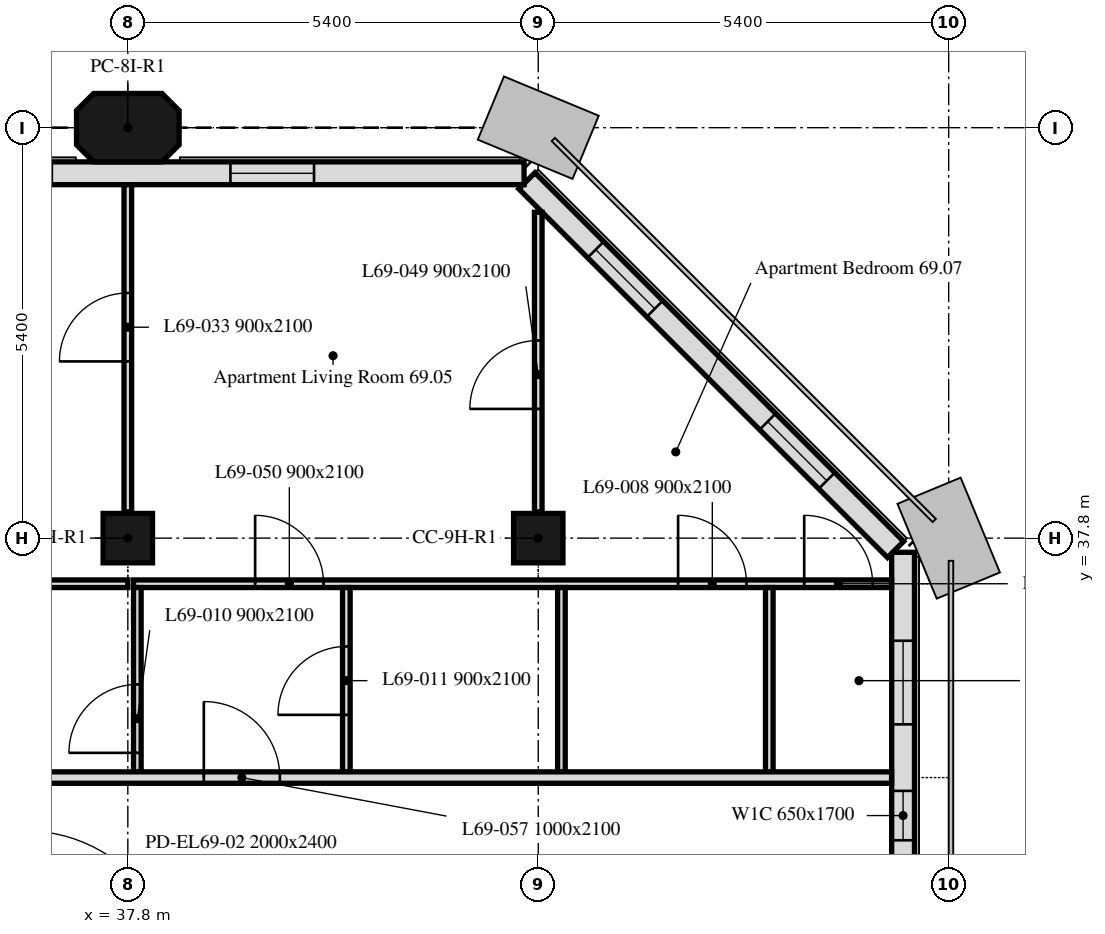
"""IFC4 building model, lengths in metres.
Left out: names, types, materials, properties, quantities, classifications, styles, units other than length and angle.
Written with IfcOpenShell. Run it as: python <this file> out.ifc"""

import sys

from ifc_helpers import new_model, si_unit, direction, frame, frame_2d, origin, origin_2d, place, context, subcontext, project, spatial, polyline, rectangle, outline, extrude, element, fill, save


model = new_model("IFC4")
c1 = context("Model", 3, precision=1e-05, world=origin(), true_north=direction((0.0, 1.0)))
c2 = subcontext(c1, "Body", "Model", "MODEL_VIEW")
j1 = project(units=[si_unit("LENGTHUNIT", "METRE"), si_unit("PLANEANGLEUNIT", "RADIAN")], contexts=[c1])
p1 = place(None, origin())
s1 = spatial("IfcSite", under=j1, at=p1, CompositionType="ELEMENT")
p2 = place(p1, origin())
s2 = spatial("IfcBuilding", under=s1, at=p2, CompositionType="ELEMENT")
p3 = place(p2, frame((0.0, 0.0, 281.8)))
s3 = spatial("IfcBuildingStorey", under=s2, at=p3, CompositionType="ELEMENT", Elevation=281.8)
for number, where, z_axis, x_axis in (
    (1, (37.8, 37.8, 0.0), (0.0, 0.0, 1.0), (1.0, 0.0, 0.0)),
    (2, (43.2, 37.8, 0.0), (0.0, 0.0, 1.0), (1.0, 0.0, 0.0)),
):
    element("IfcColumn", number, at=place(p3, frame(where, z_axis=z_axis, x_axis=x_axis)), inside=s3, PredefinedType="COLUMN", context=c2, shape_type="SweptSolid", body=[
        extrude(rectangle(XDim=0.65, YDim=0.65, at=origin_2d()), origin(), (0.0, 0.0, 1.0), 3.0),
    ])
p4 = place(p3, frame((37.8, 43.2, 0.0), z_axis=(0.0, 0.0, 1.0), x_axis=(1.0, 0.0, 0.0)))
e3 = element("IfcColumn", 3, at=p4, inside=s3, PredefinedType="COLUMN", context=c2, shape_type="SweptSolid", body=[
    extrude(outline(polyline([(-0.45, -0.45), (0.45, -0.45), (0.675, -0.225), (0.675, 0.225), (0.45, 0.45), (-0.45, 0.45), (-0.675, 0.225), (-0.675, -0.225), (-0.45, -0.45)])), origin(), (0.0, 0.0, 1.0), 3.0),
])
p5 = place(p3, frame((48.0, 5.586, 0.0), z_axis=(0.0, 0.0, 1.0), x_axis=(0.0, 1.0, 0.0)))
e4 = element("IfcWall", 4, at=p5, inside=s3, PredefinedType="SOLIDWALL", context=c2, shape_type="SweptSolid", body=[
    extrude(rectangle(XDim=32.027, YDim=0.3, at=frame_2d((16.014, 0.0))), origin(), (0.0, 0.0, 1.0), 3.0),
])
p6 = place(p5, frame((1.164, 0.0, 0.9)))
e5 = element("IfcOpeningElement", 5, at=p6, cuts=e4, PredefinedType="OPENING", context=c2, shape_type="SweptSolid", body=[
    extrude(rectangle(XDim=1.1, YDim=1.7, at=frame_2d((0.55, 0.85))), frame((0.0, 0.16, 0.0), z_axis=(0.0, -1.0, 0.0), x_axis=(1.0, 0.0, 0.0)), (0.0, 0.0, 1.0), 0.32),
])
p7 = place(p5, frame((2.764, 0.0, 0.9)))
e6 = element("IfcOpeningElement", 6, at=p7, cuts=e4, PredefinedType="OPENING", context=c2, shape_type="SweptSolid", body=[
    extrude(rectangle(XDim=1.1, YDim=1.7, at=frame_2d((0.55, 0.85))), frame((0.0, 0.16, 0.0), z_axis=(0.0, -1.0, 0.0), x_axis=(1.0, 0.0, 0.0)), (0.0, 0.0, 1.0), 0.32),
])
p8 = place(p5, frame((6.564, 0.0, 0.9)))
e7 = element("IfcOpeningElement", 7, at=p8, cuts=e4, PredefinedType="OPENING", context=c2, shape_type="SweptSolid", body=[
    extrude(rectangle(XDim=1.1, YDim=1.7, at=frame_2d((0.55, 0.85))), frame((0.0, 0.16, 0.0), z_axis=(0.0, -1.0, 0.0), x_axis=(1.0, 0.0, 0.0)), (0.0, 0.0, 1.0), 0.32),
])
p9 = place(p5, frame((8.514, 0.0, 0.9)))
e8 = element("IfcOpeningElement", 8, at=p9, cuts=e4, PredefinedType="OPENING", context=c2, shape_type="SweptSolid", body=[
    extrude(rectangle(XDim=1.1, YDim=1.7, at=frame_2d((0.55, 0.85))), frame((0.0, 0.16, 0.0), z_axis=(0.0, -1.0, 0.0), x_axis=(1.0, 0.0, 0.0)), (0.0, 0.0, 1.0), 0.32),
])
p10 = place(p5, frame((11.964, 0.0, 0.9)))
e9 = element("IfcOpeningElement", 9, at=p10, cuts=e4, PredefinedType="OPENING", context=c2, shape_type="SweptSolid", body=[
    extrude(rectangle(XDim=1.1, YDim=1.7, at=frame_2d((0.55, 0.85))), frame((0.0, 0.16, 0.0), z_axis=(0.0, -1.0, 0.0), x_axis=(1.0, 0.0, 0.0)), (0.0, 0.0, 1.0), 0.32),
])
p11 = place(p5, frame((13.564, 0.0, 0.9)))
e10 = element("IfcOpeningElement", 10, at=p11, cuts=e4, PredefinedType="OPENING", context=c2, shape_type="SweptSolid", body=[
    extrude(rectangle(XDim=1.1, YDim=1.7, at=frame_2d((0.55, 0.85))), frame((0.0, 0.16, 0.0), z_axis=(0.0, -1.0, 0.0), x_axis=(1.0, 0.0, 0.0)), (0.0, 0.0, 1.0), 0.32),
])
p12 = place(p5, frame((17.014, 0.0, 0.9)))
e11 = element("IfcOpeningElement", 11, at=p12, cuts=e4, PredefinedType="OPENING", context=c2, shape_type="SweptSolid", body=[
    extrude(rectangle(XDim=3.4, YDim=1.7, at=frame_2d((1.7, 0.85))), frame((0.0, 0.16, 0.0), z_axis=(0.0, -1.0, 0.0), x_axis=(1.0, 0.0, 0.0)), (0.0, 0.0, 1.0), 0.32),
])
p13 = place(p5, frame((22.764, 0.0, 0.9)))
e12 = element("IfcOpeningElement", 12, at=p13, cuts=e4, PredefinedType="OPENING", context=c2, shape_type="SweptSolid", body=[
    extrude(rectangle(XDim=1.1, YDim=1.7, at=frame_2d((0.55, 0.85))), frame((0.0, 0.16, 0.0), z_axis=(0.0, -1.0, 0.0), x_axis=(1.0, 0.0, 0.0)), (0.0, 0.0, 1.0), 0.32),
])
p14 = place(p5, frame((24.364, 0.0, 0.9)))
e13 = element("IfcOpeningElement", 13, at=p14, cuts=e4, PredefinedType="OPENING", context=c2, shape_type="SweptSolid", body=[
    extrude(rectangle(XDim=1.1, YDim=1.7, at=frame_2d((0.55, 0.85))), frame((0.0, 0.16, 0.0), z_axis=(0.0, -1.0, 0.0), x_axis=(1.0, 0.0, 0.0)), (0.0, 0.0, 1.0), 0.32),
])
p15 = place(p5, frame((28.239, 0.0, 0.9)))
e14 = element("IfcOpeningElement", 14, at=p15, cuts=e4, PredefinedType="OPENING", context=c2, shape_type="SweptSolid", body=[
    extrude(rectangle(XDim=0.65, YDim=1.7, at=frame_2d((0.325, 0.85))), frame((0.0, 0.16, 0.0), z_axis=(0.0, -1.0, 0.0), x_axis=(1.0, 0.0, 0.0)), (0.0, 0.0, 1.0), 0.32),
])
p16 = place(p5, frame((29.764, 0.0, 0.9)))
e15 = element("IfcOpeningElement", 15, at=p16, cuts=e4, PredefinedType="OPENING", context=c2, shape_type="SweptSolid", body=[
    extrude(rectangle(XDim=1.1, YDim=1.7, at=frame_2d((0.55, 0.85))), frame((0.0, 0.16, 0.0), z_axis=(0.0, -1.0, 0.0), x_axis=(1.0, 0.0, 0.0)), (0.0, 0.0, 1.0), 0.32),
])
p17 = place(p3, frame((47.901, 37.65, 0.0), z_axis=(0.0, 0.0, 1.0), x_axis=(-0.707106781187, 0.707106781187, 0.0)))
e16 = element("IfcWall", 16, at=p17, inside=s3, PredefinedType="SOLIDWALL", context=c2, shape_type="SweptSolid", body=[
    extrude(rectangle(XDim=6.86, YDim=0.3, at=frame_2d((3.43, 0.0))), origin(), (0.0, 0.0, 1.0), 3.0),
])
p18 = place(p17, frame((1.28, 0.0, 0.9)))
e17 = element("IfcOpeningElement", 17, at=p18, cuts=e16, PredefinedType="OPENING", context=c2, shape_type="SweptSolid", body=[
    extrude(rectangle(XDim=1.1, YDim=1.7, at=frame_2d((0.55, 0.85))), frame((0.0, 0.16, 0.0), z_axis=(0.0, -1.0, 0.0), x_axis=(1.0, 0.0, 0.0)), (0.0, 0.0, 1.0), 0.32),
])
p19 = place(p17, frame((4.48, 0.0, 0.9)))
e18 = element("IfcOpeningElement", 18, at=p19, cuts=e16, PredefinedType="OPENING", context=c2, shape_type="SweptSolid", body=[
    extrude(rectangle(XDim=1.1, YDim=1.7, at=frame_2d((0.55, 0.85))), frame((0.0, 0.16, 0.0), z_axis=(0.0, -1.0, 0.0), x_axis=(1.0, 0.0, 0.0)), (0.0, 0.0, 1.0), 0.32),
])
p20 = place(p3, frame((43.014, 42.6, 0.0), z_axis=(0.0, 0.0, 1.0), x_axis=(-1.0, 0.0, 0.0)))
e19 = element("IfcWall", 19, at=p20, inside=s3, PredefinedType="SOLIDWALL", context=c2, shape_type="SweptSolid", body=[
    extrude(rectangle(XDim=32.027, YDim=0.3, at=frame_2d((16.014, 0.0))), origin(), (0.0, 0.0, 1.0), 3.0),
])
p21 = place(p20, frame((2.764, 0.0, 0.9)))
e20 = element("IfcOpeningElement", 20, at=p21, cuts=e19, PredefinedType="OPENING", context=c2, shape_type="SweptSolid", body=[
    extrude(rectangle(XDim=1.1, YDim=1.7, at=frame_2d((0.55, 0.85))), frame((0.0, 0.16, 0.0), z_axis=(0.0, -1.0, 0.0), x_axis=(1.0, 0.0, 0.0)), (0.0, 0.0, 1.0), 0.32),
])
p22 = place(p20, frame((6.214, 0.0, 0.9)))
e21 = element("IfcOpeningElement", 21, at=p22, cuts=e19, PredefinedType="OPENING", context=c2, shape_type="SweptSolid", body=[
    extrude(rectangle(XDim=3.4, YDim=1.7, at=frame_2d((1.7, 0.85))), frame((0.0, 0.16, 0.0), z_axis=(0.0, -1.0, 0.0), x_axis=(1.0, 0.0, 0.0)), (0.0, 0.0, 1.0), 0.32),
])
p23 = place(p20, frame((13.564, 0.0, 0.9)))
e22 = element("IfcOpeningElement", 22, at=p23, cuts=e19, PredefinedType="OPENING", context=c2, shape_type="SweptSolid", body=[
    extrude(rectangle(XDim=1.1, YDim=1.7, at=frame_2d((0.55, 0.85))), frame((0.0, 0.16, 0.0), z_axis=(0.0, -1.0, 0.0), x_axis=(1.0, 0.0, 0.0)), (0.0, 0.0, 1.0), 0.32),
])
p24 = place(p20, frame((17.014, 0.0, 0.9)))
e23 = element("IfcOpeningElement", 23, at=p24, cuts=e19, PredefinedType="OPENING", context=c2, shape_type="SweptSolid", body=[
    extrude(rectangle(XDim=3.4, YDim=1.7, at=frame_2d((1.7, 0.85))), frame((0.0, 0.16, 0.0), z_axis=(0.0, -1.0, 0.0), x_axis=(1.0, 0.0, 0.0)), (0.0, 0.0, 1.0), 0.32),
])
p25 = place(p20, frame((24.364, 0.0, 0.9)))
e24 = element("IfcOpeningElement", 24, at=p25, cuts=e19, PredefinedType="OPENING", context=c2, shape_type="SweptSolid", body=[
    extrude(rectangle(XDim=1.1, YDim=1.7, at=frame_2d((0.55, 0.85))), frame((0.0, 0.16, 0.0), z_axis=(0.0, -1.0, 0.0), x_axis=(1.0, 0.0, 0.0)), (0.0, 0.0, 1.0), 0.32),
])
p26 = place(p20, frame((27.814, 0.0, 0.9)))
e25 = element("IfcOpeningElement", 25, at=p26, cuts=e19, PredefinedType="OPENING", context=c2, shape_type="SweptSolid", body=[
    extrude(rectangle(XDim=3.4, YDim=1.7, at=frame_2d((1.7, 0.85))), frame((0.0, 0.16, 0.0), z_axis=(0.0, -1.0, 0.0), x_axis=(1.0, 0.0, 0.0)), (0.0, 0.0, 1.0), 0.32),
])
p27 = place(p3, frame((27.164, 37.2, 0.0), z_axis=(0.0, 0.0, 1.0), x_axis=(1.0, 0.0, 0.0)))
e26 = element("IfcWall", 26, at=p27, inside=s3, PredefinedType="PARTITIONING", context=c2, shape_type="SweptSolid", body=[
    extrude(rectangle(XDim=10.636, YDim=0.1, at=frame_2d((5.318, 0.0))), origin(), (0.0, 0.0, 1.0), 3.0),
])
p28 = place(p27, frame((1.807, 0.0, 0.0)))
e27 = element("IfcOpeningElement", 27, at=p28, cuts=e26, PredefinedType="OPENING", context=c2, shape_type="SweptSolid", body=[
    extrude(rectangle(XDim=0.9, YDim=2.1, at=frame_2d((0.45, 1.05))), frame((0.0, 0.05, 0.0), z_axis=(0.0, -1.0, 0.0), x_axis=(1.0, 0.0, 0.0)), (0.0, 0.0, 1.0), 0.1),
])
p29 = place(p27, frame((3.941, 0.0, 0.0)))
e28 = element("IfcOpeningElement", 28, at=p29, cuts=e26, PredefinedType="OPENING", context=c2, shape_type="SweptSolid", body=[
    extrude(rectangle(XDim=0.9, YDim=2.1, at=frame_2d((0.45, 1.05))), frame((0.0, 0.05, 0.0), z_axis=(0.0, -1.0, 0.0), x_axis=(1.0, 0.0, 0.0)), (0.0, 0.0, 1.0), 0.1),
])
p30 = place(p27, frame((6.586, 0.0, 0.0)))
e29 = element("IfcOpeningElement", 29, at=p30, cuts=e26, PredefinedType="OPENING", context=c2, shape_type="SweptSolid", body=[
    extrude(rectangle(XDim=0.9, YDim=2.1, at=frame_2d((0.45, 1.05))), frame((0.0, 0.05, 0.0), z_axis=(0.0, -1.0, 0.0), x_axis=(1.0, 0.0, 0.0)), (0.0, 0.0, 1.0), 0.1),
])
p31 = place(p3, frame((37.8, 38.145, 0.0), z_axis=(0.0, 0.0, 1.0), x_axis=(0.0, 1.0, 0.0)))
e30 = element("IfcWall", 30, at=p31, inside=s3, PredefinedType="PARTITIONING", context=c2, shape_type="SweptSolid", body=[
    extrude(rectangle(XDim=4.304, YDim=0.1, at=frame_2d((2.152, 0.0))), origin(), (0.0, 0.0, 1.0), 3.0),
])
p32 = place(p31, frame((1.98, 0.0, 0.0)))
e31 = element("IfcOpeningElement", 31, at=p32, cuts=e30, PredefinedType="OPENING", context=c2, shape_type="SweptSolid", body=[
    extrude(rectangle(XDim=0.9, YDim=2.1, at=frame_2d((0.45, 1.05))), frame((0.0, 0.05, 0.0), z_axis=(0.0, -1.0, 0.0), x_axis=(1.0, 0.0, 0.0)), (0.0, 0.0, 1.0), 0.1),
])
p33 = place(p3, frame((43.2, 38.145, 0.0), z_axis=(0.0, 0.0, 1.0), x_axis=(0.0, 1.0, 0.0)))
e32 = element("IfcWall", 32, at=p33, inside=s3, PredefinedType="PARTITIONING", context=c2, shape_type="SweptSolid", body=[
    extrude(rectangle(XDim=3.943, YDim=0.1, at=frame_2d((1.971, 0.0))), origin(), (0.0, 0.0, 1.0), 3.0),
])
p34 = place(p33, frame((1.355, 0.0, 0.0)))
e33 = element("IfcOpeningElement", 33, at=p34, cuts=e32, PredefinedType="OPENING", context=c2, shape_type="SweptSolid", body=[
    extrude(rectangle(XDim=0.9, YDim=2.1, at=frame_2d((0.45, 1.05))), frame((0.0, 0.05, 0.0), z_axis=(0.0, -1.0, 0.0), x_axis=(1.0, 0.0, 0.0)), (0.0, 0.0, 1.0), 0.1),
])
p35 = place(p3, frame((37.875, 37.2, 0.0), z_axis=(0.0, 0.0, 1.0), x_axis=(1.0, 0.0, 0.0)))
e34 = element("IfcWall", 34, at=p35, inside=s3, PredefinedType="PARTITIONING", context=c2, shape_type="SweptSolid", body=[
    extrude(rectangle(XDim=9.974, YDim=0.1, at=frame_2d((4.987, 0.0))), origin(), (0.0, 0.0, 1.0), 3.0),
])
p36 = place(p35, frame((7.165, 0.0, 0.0)))
e35 = element("IfcOpeningElement", 35, at=p36, cuts=e34, PredefinedType="OPENING", context=c2, shape_type="SweptSolid", body=[
    extrude(rectangle(XDim=0.9, YDim=2.1, at=frame_2d((0.45, 1.05))), frame((0.0, 0.05, 0.0), z_axis=(0.0, -1.0, 0.0), x_axis=(1.0, 0.0, 0.0)), (0.0, 0.0, 1.0), 0.1),
])
p37 = place(p35, frame((8.824, 0.0, 0.0)))
e36 = element("IfcOpeningElement", 36, at=p37, cuts=e34, PredefinedType="OPENING", context=c2, shape_type="SweptSolid", body=[
    extrude(rectangle(XDim=0.9, YDim=2.1, at=frame_2d((0.45, 1.05))), frame((0.0, 0.05, 0.0), z_axis=(0.0, -1.0, 0.0), x_axis=(1.0, 0.0, 0.0)), (0.0, 0.0, 1.0), 0.1),
])
p38 = place(p35, frame((1.6, 0.0, 0.0)))
e37 = element("IfcOpeningElement", 37, at=p38, cuts=e34, PredefinedType="OPENING", context=c2, shape_type="SweptSolid", body=[
    extrude(rectangle(XDim=0.9, YDim=2.1, at=frame_2d((0.45, 1.05))), frame((0.0, 0.05, 0.0), z_axis=(0.0, -1.0, 0.0), x_axis=(1.0, 0.0, 0.0)), (0.0, 0.0, 1.0), 0.1),
])
p39 = place(p3, frame((37.925, 34.725, 0.0), z_axis=(0.0, 0.0, 1.0), x_axis=(0.0, 1.0, 0.0)))
e38 = element("IfcWall", 38, at=p39, inside=s3, PredefinedType="PARTITIONING", context=c2, shape_type="SweptSolid", body=[
    extrude(rectangle(XDim=2.425, YDim=0.1, at=frame_2d((1.212, 0.0))), origin(), (0.0, 0.0, 1.0), 3.0),
])
p40 = place(p39, frame((0.25, 0.0, 0.0)))
e39 = element("IfcOpeningElement", 39, at=p40, cuts=e38, PredefinedType="OPENING", context=c2, shape_type="SweptSolid", body=[
    extrude(rectangle(XDim=0.9, YDim=2.1, at=frame_2d((0.45, 1.05))), frame((0.0, 0.05, 0.0), z_axis=(0.0, -1.0, 0.0), x_axis=(1.0, 0.0, 0.0)), (0.0, 0.0, 1.0), 0.1),
])
p41 = place(p3, frame((40.675, 34.725, 0.0), z_axis=(0.0, 0.0, 1.0), x_axis=(0.0, 1.0, 0.0)))
e40 = element("IfcWall", 40, at=p41, inside=s3, PredefinedType="PARTITIONING", context=c2, shape_type="SweptSolid", body=[
    extrude(rectangle(XDim=2.425, YDim=0.1, at=frame_2d((1.212, 0.0))), origin(), (0.0, 0.0, 1.0), 3.0),
])
p42 = place(p41, frame((0.75, 0.0, 0.0)))
e41 = element("IfcOpeningElement", 41, at=p42, cuts=e40, PredefinedType="OPENING", context=c2, shape_type="SweptSolid", body=[
    extrude(rectangle(XDim=0.9, YDim=2.1, at=frame_2d((0.45, 1.05))), frame((0.0, 0.05, 0.0), z_axis=(0.0, -1.0, 0.0), x_axis=(1.0, 0.0, 0.0)), (0.0, 0.0, 1.0), 0.1),
])
for number, where, z_axis, x_axis in (
    (42, (43.505, 34.725, 0.0), (0.0, 0.0, 1.0), (0.0, 1.0, 0.0)),
    (43, (46.24, 34.725, 0.0), (0.0, 0.0, 1.0), (0.0, 1.0, 0.0)),
):
    element("IfcWall", number, at=place(p3, frame(where, z_axis=z_axis, x_axis=x_axis)), inside=s3, PredefinedType="PARTITIONING", context=c2, shape_type="SweptSolid", body=[
        extrude(rectangle(XDim=2.425, YDim=0.1, at=frame_2d((1.212, 0.0))), origin(), (0.0, 0.0, 1.0), 3.0),
    ])
p43 = place(p3, frame((6.151, 34.65, 0.0), z_axis=(0.0, 0.0, 1.0), x_axis=(1.0, 0.0, 0.0)))
e44 = element("IfcWall", 44, at=p43, inside=s3, PredefinedType="PARTITIONING", context=c2, shape_type="SweptSolid", body=[
    extrude(rectangle(XDim=41.698, YDim=0.15, at=frame_2d((20.849, 0.0))), origin(), (0.0, 0.0, 1.0), 3.0),
])
p44 = place(p43, frame((2.519, 0.0, 0.0)))
e45 = element("IfcOpeningElement", 45, at=p44, cuts=e44, PredefinedType="OPENING", context=c2, shape_type="SweptSolid", body=[
    extrude(rectangle(XDim=1.0, YDim=2.1, at=frame_2d((0.5, 1.05))), frame((0.0, 0.075, 0.0), z_axis=(0.0, -1.0, 0.0), x_axis=(1.0, 0.0, 0.0)), (0.0, 0.0, 1.0), 0.15),
])
p45 = place(p43, frame((13.077, 0.0, 0.0)))
e46 = element("IfcOpeningElement", 46, at=p45, cuts=e44, PredefinedType="OPENING", context=c2, shape_type="SweptSolid", body=[
    extrude(rectangle(XDim=1.0, YDim=2.1, at=frame_2d((0.5, 1.05))), frame((0.0, 0.075, 0.0), z_axis=(0.0, -1.0, 0.0), x_axis=(1.0, 0.0, 0.0)), (0.0, 0.0, 1.0), 0.15),
])
p46 = place(p43, frame((32.649, 0.0, 0.0)))
e47 = element("IfcOpeningElement", 47, at=p46, cuts=e44, PredefinedType="OPENING", context=c2, shape_type="SweptSolid", body=[
    extrude(rectangle(XDim=1.0, YDim=2.1, at=frame_2d((0.5, 1.05))), frame((0.0, 0.075, 0.0), z_axis=(0.0, -1.0, 0.0), x_axis=(1.0, 0.0, 0.0)), (0.0, 0.0, 1.0), 0.15),
])
p47 = place(p15, origin())
e48 = element("IfcWindow", 48, at=p47, inside=s3, PartitioningType="SINGLE_PANEL", PredefinedType="WINDOW", context=c2, shape_type="SweptSolid", body=[
    extrude(rectangle(XDim=0.65, YDim=1.7, at=frame_2d((0.325, 0.85))), frame((0.0, 0.03, 0.0), z_axis=(0.0, -1.0, 0.0), x_axis=(1.0, 0.0, 0.0)), (0.0, 0.0, 1.0), 0.06),
])
fill(e14, e48)
p48 = place(p16, origin())
e49 = element("IfcWindow", 49, at=p48, inside=s3, PartitioningType="SINGLE_PANEL", PredefinedType="WINDOW", context=c2, shape_type="SweptSolid", body=[
    extrude(rectangle(XDim=1.1, YDim=1.7, at=frame_2d((0.55, 0.85))), frame((0.0, 0.03, 0.0), z_axis=(0.0, -1.0, 0.0), x_axis=(1.0, 0.0, 0.0)), (0.0, 0.0, 1.0), 0.06),
])
fill(e15, e49)
p49 = place(p18, origin())
e50 = element("IfcWindow", 50, at=p49, inside=s3, PartitioningType="SINGLE_PANEL", PredefinedType="WINDOW", context=c2, shape_type="SweptSolid", body=[
    extrude(rectangle(XDim=1.1, YDim=1.7, at=frame_2d((0.55, 0.85))), frame((0.0, 0.03, 0.0), z_axis=(0.0, -1.0, 0.0), x_axis=(1.0, 0.0, 0.0)), (0.0, 0.0, 1.0), 0.06),
])
fill(e17, e50)
p50 = place(p19, origin())
e51 = element("IfcWindow", 51, at=p50, inside=s3, PartitioningType="SINGLE_PANEL", PredefinedType="WINDOW", context=c2, shape_type="SweptSolid", body=[
    extrude(rectangle(XDim=1.1, YDim=1.7, at=frame_2d((0.55, 0.85))), frame((0.0, 0.03, 0.0), z_axis=(0.0, -1.0, 0.0), x_axis=(1.0, 0.0, 0.0)), (0.0, 0.0, 1.0), 0.06),
])
fill(e18, e51)
p51 = place(p21, origin())
e52 = element("IfcWindow", 52, at=p51, inside=s3, PartitioningType="SINGLE_PANEL", PredefinedType="WINDOW", context=c2, shape_type="SweptSolid", body=[
    extrude(rectangle(XDim=1.1, YDim=1.7, at=frame_2d((0.55, 0.85))), frame((0.0, 0.03, 0.0), z_axis=(0.0, -1.0, 0.0), x_axis=(1.0, 0.0, 0.0)), (0.0, 0.0, 1.0), 0.06),
])
fill(e20, e52)
p52 = place(p36, origin())
e53 = element("IfcDoor", 53, at=p52, inside=s3, OperationType="SINGLE_SWING_RIGHT", PredefinedType="DOOR", context=c2, shape_type="SweptSolid", body=[
    extrude(rectangle(XDim=0.9, YDim=2.1, at=frame_2d((0.45, 1.05))), frame((0.0, 0.025, 0.0), z_axis=(0.0, -1.0, 0.0), x_axis=(1.0, 0.0, 0.0)), (0.0, 0.0, 1.0), 0.05),
])
fill(e35, e53)
p53 = place(p37, origin())
e54 = element("IfcDoor", 54, at=p53, inside=s3, OperationType="SINGLE_SWING_LEFT", PredefinedType="DOOR", context=c2, shape_type="SweptSolid", body=[
    extrude(rectangle(XDim=0.9, YDim=2.1, at=frame_2d((0.45, 1.05))), frame((0.0, 0.025, 0.0), z_axis=(0.0, -1.0, 0.0), x_axis=(1.0, 0.0, 0.0)), (0.0, 0.0, 1.0), 0.05),
])
fill(e36, e54)
p54 = place(p40, origin())
e55 = element("IfcDoor", 55, at=p54, inside=s3, OperationType="SINGLE_SWING_LEFT", PredefinedType="DOOR", context=c2, shape_type="SweptSolid", body=[
    extrude(rectangle(XDim=0.9, YDim=2.1, at=frame_2d((0.45, 1.05))), frame((0.0, 0.025, 0.0), z_axis=(0.0, -1.0, 0.0), x_axis=(1.0, 0.0, 0.0)), (0.0, 0.0, 1.0), 0.05),
])
fill(e39, e55)
p55 = place(p42, origin())
e56 = element("IfcDoor", 56, at=p55, inside=s3, OperationType="SINGLE_SWING_RIGHT", PredefinedType="DOOR", context=c2, shape_type="SweptSolid", body=[
    extrude(rectangle(XDim=0.9, YDim=2.1, at=frame_2d((0.45, 1.05))), frame((0.0, 0.025, 0.0), z_axis=(0.0, -1.0, 0.0), x_axis=(1.0, 0.0, 0.0)), (0.0, 0.0, 1.0), 0.05),
])
fill(e41, e56)
p56 = place(p32, origin())
e57 = element("IfcDoor", 57, at=p56, inside=s3, OperationType="SINGLE_SWING_RIGHT", PredefinedType="DOOR", context=c2, shape_type="SweptSolid", body=[
    extrude(rectangle(XDim=0.9, YDim=2.1, at=frame_2d((0.45, 1.05))), frame((0.0, 0.025, 0.0), z_axis=(0.0, -1.0, 0.0), x_axis=(1.0, 0.0, 0.0)), (0.0, 0.0, 1.0), 0.05),
])
fill(e31, e57)
p57 = place(p34, origin())
e58 = element("IfcDoor", 58, at=p57, inside=s3, OperationType="SINGLE_SWING_LEFT", PredefinedType="DOOR", context=c2, shape_type="SweptSolid", body=[
    extrude(rectangle(XDim=0.9, YDim=2.1, at=frame_2d((0.45, 1.05))), frame((0.0, 0.025, 0.0), z_axis=(0.0, -1.0, 0.0), x_axis=(1.0, 0.0, 0.0)), (0.0, 0.0, 1.0), 0.05),
])
fill(e33, e58)
p58 = place(p38, origin())
e59 = element("IfcDoor", 59, at=p58, inside=s3, OperationType="SINGLE_SWING_LEFT", PredefinedType="DOOR", context=c2, shape_type="SweptSolid", body=[
    extrude(rectangle(XDim=0.9, YDim=2.1, at=frame_2d((0.45, 1.05))), frame((0.0, 0.025, 0.0), z_axis=(0.0, -1.0, 0.0), x_axis=(1.0, 0.0, 0.0)), (0.0, 0.0, 1.0), 0.05),
])
fill(e37, e59)
p59 = place(p46, origin())
e60 = element("IfcDoor", 60, at=p59, inside=s3, OperationType="SINGLE_SWING_RIGHT", PredefinedType="DOOR", context=c2, shape_type="SweptSolid", body=[
    extrude(rectangle(XDim=1.0, YDim=2.1, at=frame_2d((0.5, 1.05))), frame((0.0, 0.025, 0.0), z_axis=(0.0, -1.0, 0.0), x_axis=(1.0, 0.0, 0.0)), (0.0, 0.0, 1.0), 0.05),
])
fill(e47, e60)
save(model, sys.argv[1])
